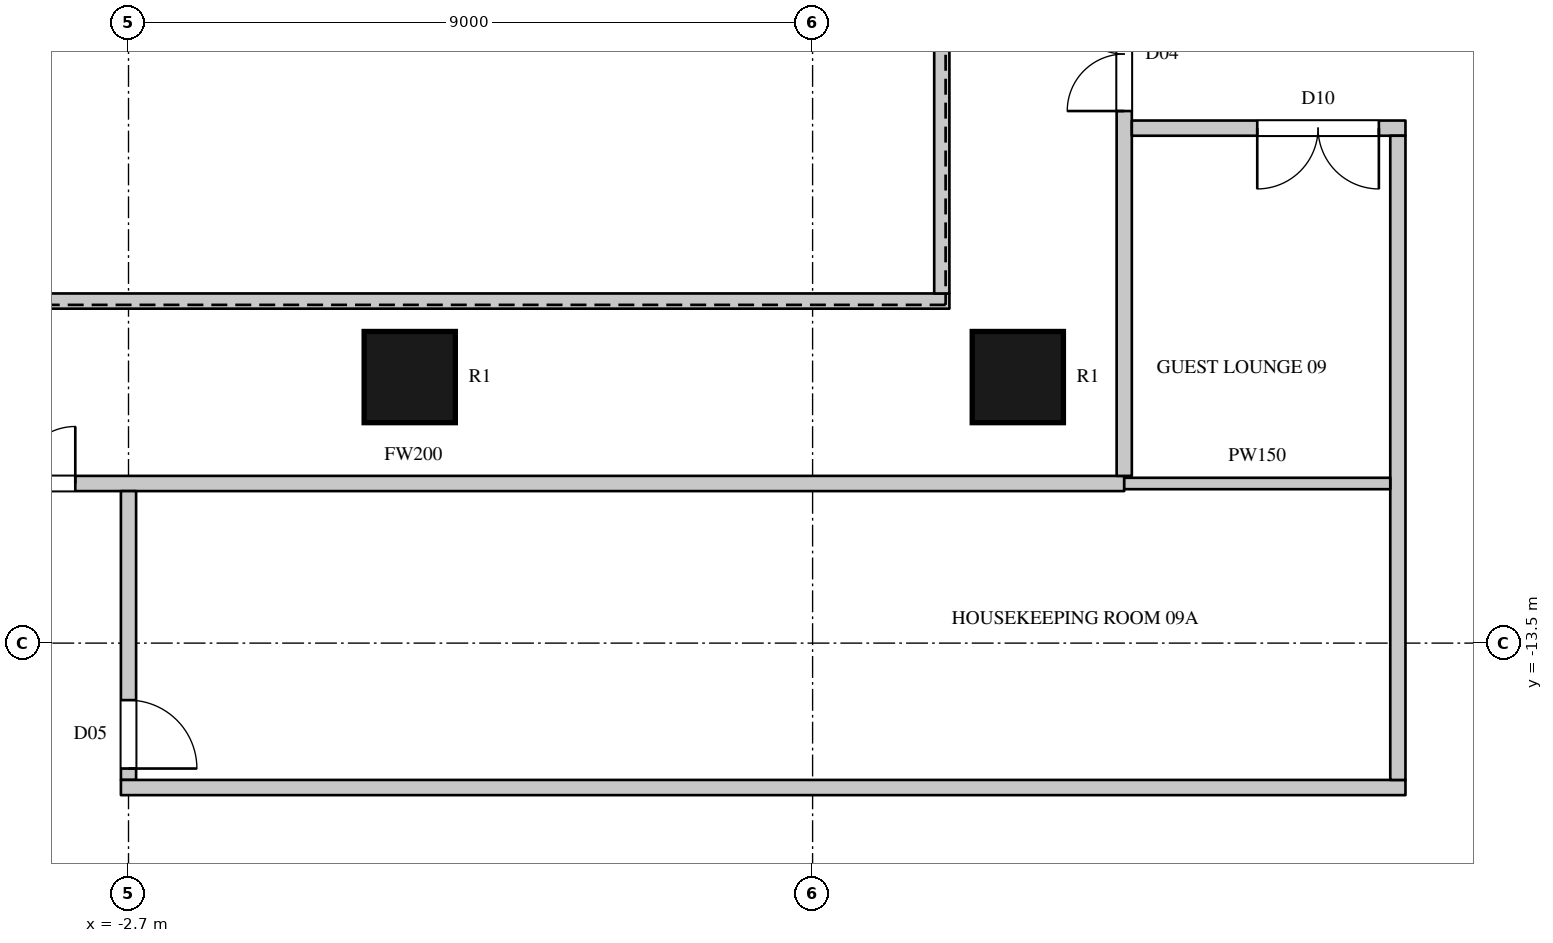
"""IFC4 building model, lengths in metres.
Left out: names, types, materials, properties, quantities, classifications, styles, units other than length and angle.
Written with IfcOpenShell. Run it as: python <this file> out.ifc"""

import sys

from ifc_helpers import new_model, si_unit, direction, frame, frame_2d, origin, origin_2d, place, context, subcontext, project, spatial, rectangle, circle, extrude, element, fill, save


model = new_model("IFC4")
c1 = context("Model", 3, precision=1e-05, world=origin(), true_north=direction((0.0, 1.0)))
c2 = subcontext(c1, "Body", "Model", "MODEL_VIEW")
j1 = project(units=[si_unit("LENGTHUNIT", "METRE"), si_unit("PLANEANGLEUNIT", "RADIAN")], contexts=[c1])
p1 = place(None, origin())
s1 = spatial("IfcSite", under=j1, at=p1, CompositionType="ELEMENT")
p2 = place(p1, origin())
s2 = spatial("IfcBuilding", under=s1, at=p2, CompositionType="ELEMENT")
p3 = place(p2, frame((0.0, 0.0, 62.7)))
s3 = spatial("IfcBuildingStorey", under=s2, at=p3, CompositionType="ELEMENT", Elevation=62.7)
for number, where, z_axis, x_axis in (
    (1, (1.0, -10.0, 0.0), (0.0, 0.0, 1.0), (1.0, 0.0, 0.0)),
    (2, (9.0, -10.0, 0.0), (0.0, 0.0, 1.0), (1.0, 0.0, 0.0)),
):
    element("IfcColumn", number, at=place(p3, frame(where, z_axis=z_axis, x_axis=x_axis)), inside=s3, PredefinedType="COLUMN", context=c2, shape_type="SweptSolid", body=[
        extrude(circle(Radius=0.6, at=origin_2d()), origin(), (0.0, 0.0, 1.0), 3.6),
    ])
p4 = place(p3, frame((-8.3, -11.4, 0.0), z_axis=(0.0, 0.0, 1.0), x_axis=(1.0, 0.0, 0.0)))
e3 = element("IfcWall", 3, at=p4, inside=s3, PredefinedType="PARTITIONING", context=c2, shape_type="SweptSolid", body=[
    extrude(rectangle(XDim=18.7, YDim=0.2, at=frame_2d((9.35, 0.0))), origin(), (0.0, 0.0, 1.0), 3.3),
])
p5 = place(p4, frame((3.4, 0.0, 0.0)))
e4 = element("IfcOpeningElement", 4, at=p5, cuts=e3, PredefinedType="OPENING", context=c2, shape_type="SweptSolid", body=[
    extrude(rectangle(XDim=1.5, YDim=2.2, at=frame_2d((0.75, 1.1))), frame((0.0, 0.11, 0.0), z_axis=(0.0, -1.0, 0.0), x_axis=(1.0, 0.0, 0.0)), (0.0, 0.0, 1.0), 0.22),
])
p6 = place(p3, frame((-6.1, -9.0, 0.0), z_axis=(0.0, 0.0, 1.0), x_axis=(1.0, 0.0, 0.0)))
e5 = element("IfcWall", 5, at=p6, inside=s3, PredefinedType="PARTITIONING", context=c2, shape_type="SweptSolid", body=[
    extrude(rectangle(XDim=14.2, YDim=0.2, at=frame_2d((7.1, 0.0))), origin(), (0.0, 0.0, 1.0), 3.3),
])
p7 = place(p3, frame((-2.7, -15.3, 0.0), z_axis=(0.0, 0.0, 1.0), x_axis=(0.0, 1.0, 0.0)))
e6 = element("IfcWall", 6, at=p7, inside=s3, PredefinedType="PARTITIONING", context=c2, shape_type="SweptSolid", body=[
    extrude(rectangle(XDim=3.8, YDim=0.2, at=frame_2d((1.9, 0.0))), origin(), (0.0, 0.0, 1.0), 2.75),
])
p8 = place(p7, frame((0.15, 0.0, 0.0)))
e7 = element("IfcOpeningElement", 7, at=p8, cuts=e6, PredefinedType="OPENING", context=c2, shape_type="SweptSolid", body=[
    extrude(rectangle(XDim=0.9, YDim=2.2, at=frame_2d((0.45, 1.1))), frame((0.0, 0.11, 0.0), z_axis=(0.0, -1.0, 0.0), x_axis=(1.0, 0.0, 0.0)), (0.0, 0.0, 1.0), 0.22),
])
p9 = place(p3, frame((-2.8, -15.4, 0.0), z_axis=(0.0, 0.0, 1.0), x_axis=(1.0, 0.0, 0.0)))
e8 = element("IfcWall", 8, at=p9, inside=s3, PredefinedType="PARTITIONING", context=c2, shape_type="SweptSolid", body=[
    extrude(rectangle(XDim=16.9, YDim=0.2, at=frame_2d((8.45, 0.0))), origin(), (0.0, 0.0, 1.0), 3.3),
])
p10 = place(p3, frame((8.0, -8.9, 0.0), z_axis=(0.0, 0.0, 1.0), x_axis=(0.0, 1.0, 0.0)))
e9 = element("IfcWall", 9, at=p10, inside=s3, PredefinedType="PARTITIONING", context=c2, shape_type="SweptSolid", body=[
    extrude(rectangle(XDim=17.8, YDim=0.2, at=frame_2d((8.9, 0.0))), origin(), (0.0, 0.0, 1.0), 3.3),
])
p11 = place(p3, frame((10.4, -11.3, 0.0), z_axis=(0.0, 0.0, 1.0), x_axis=(0.0, 1.0, 0.0)))
e10 = element("IfcWall", 10, at=p11, inside=s3, PredefinedType="PARTITIONING", context=c2, shape_type="SweptSolid", body=[
    extrude(rectangle(XDim=22.6, YDim=0.2, at=frame_2d((11.3, 0.0))), origin(), (0.0, 0.0, 1.0), 3.3),
])
p12 = place(p11, frame((4.8, 0.0, 0.0)))
e11 = element("IfcOpeningElement", 11, at=p12, cuts=e10, PredefinedType="OPENING", context=c2, shape_type="SweptSolid", body=[
    extrude(rectangle(XDim=1.5, YDim=2.2, at=frame_2d((0.75, 1.1))), frame((0.0, 0.11, 0.0), z_axis=(0.0, -1.0, 0.0), x_axis=(1.0, 0.0, 0.0)), (0.0, 0.0, 1.0), 0.22),
])
p13 = place(p11, frame((16.3, 0.0, 0.0)))
e12 = element("IfcOpeningElement", 12, at=p13, cuts=e10, PredefinedType="OPENING", context=c2, shape_type="SweptSolid", body=[
    extrude(rectangle(XDim=1.5, YDim=2.2, at=frame_2d((0.75, 1.1))), frame((0.0, 0.11, 0.0), z_axis=(0.0, -1.0, 0.0), x_axis=(1.0, 0.0, 0.0)), (0.0, 0.0, 1.0), 0.22),
])
p14 = place(p11, frame((11.95, 0.0, 0.0)))
e13 = element("IfcOpeningElement", 13, at=p14, cuts=e10, PredefinedType="OPENING", context=c2, shape_type="SweptSolid", body=[
    extrude(rectangle(XDim=1.5, YDim=2.2, at=frame_2d((0.75, 1.1))), frame((0.0, 0.11, 0.0), z_axis=(0.0, -1.0, 0.0), x_axis=(1.0, 0.0, 0.0)), (0.0, 0.0, 1.0), 0.22),
])
p15 = place(p3, frame((10.5, -6.725, 0.0), z_axis=(0.0, 0.0, 1.0), x_axis=(1.0, 0.0, 0.0)))
e14 = element("IfcWall", 14, at=p15, inside=s3, PredefinedType="PARTITIONING", context=c2, shape_type="SweptSolid", body=[
    extrude(rectangle(XDim=3.6, YDim=0.2, at=frame_2d((1.8, 0.0))), origin(), (0.0, 0.0, 1.0), 3.3),
])
p16 = place(p15, frame((1.65, 0.0, 0.0)))
e15 = element("IfcOpeningElement", 15, at=p16, cuts=e14, PredefinedType="OPENING", context=c2, shape_type="SweptSolid", body=[
    extrude(rectangle(XDim=1.6, YDim=2.4, at=frame_2d((0.8, 1.2))), frame((0.0, 0.11, 0.0), z_axis=(0.0, -1.0, 0.0), x_axis=(1.0, 0.0, 0.0)), (0.0, 0.0, 1.0), 0.22),
])
p17 = place(p3, frame((14.0, -15.3, 0.0), z_axis=(0.0, 0.0, 1.0), x_axis=(0.0, 1.0, 0.0)))
e16 = element("IfcWall", 16, at=p17, inside=s3, PredefinedType="PARTITIONING", context=c2, shape_type="SweptSolid", body=[
    extrude(rectangle(XDim=8.475, YDim=0.2, at=frame_2d((4.238, 0.0))), origin(), (0.0, 0.0, 1.0), 3.3),
])
p18 = place(p3, frame((10.4, -11.4, 0.0), z_axis=(0.0, 0.0, 1.0), x_axis=(1.0, 0.0, 0.0)))
e17 = element("IfcWall", 17, at=p18, inside=s3, PredefinedType="PARTITIONING", context=c2, shape_type="SweptSolid", body=[
    extrude(rectangle(XDim=3.5, YDim=0.15, at=frame_2d((1.75, 0.0))), origin(), (0.0, 0.0, 1.0), 3.3),
])
p19 = place(p5, origin())
e18 = element("IfcDoor", 18, at=p19, inside=s3, OperationType="DOUBLE_DOOR_SINGLE_SWING", PredefinedType="DOOR", context=c2, shape_type="SweptSolid", body=[
    extrude(rectangle(XDim=1.5, YDim=2.2, at=frame_2d((0.75, 1.1))), frame((0.0, 0.025, 0.0), z_axis=(0.0, -1.0, 0.0), x_axis=(1.0, 0.0, 0.0)), (0.0, 0.0, 1.0), 0.05),
])
fill(e4, e18)
p20 = place(p12, origin())
e19 = element("IfcDoor", 19, at=p20, inside=s3, OperationType="DOUBLE_DOOR_SINGLE_SWING", PredefinedType="DOOR", context=c2, shape_type="SweptSolid", body=[
    extrude(rectangle(XDim=1.5, YDim=2.2, at=frame_2d((0.75, 1.1))), frame((0.0, 0.025, 0.0), z_axis=(0.0, -1.0, 0.0), x_axis=(1.0, 0.0, 0.0)), (0.0, 0.0, 1.0), 0.05),
])
fill(e11, e19)
p21 = place(p8, origin())
e20 = element("IfcDoor", 20, at=p21, inside=s3, OperationType="SINGLE_SWING_RIGHT", PredefinedType="DOOR", context=c2, shape_type="SweptSolid", body=[
    extrude(rectangle(XDim=0.9, YDim=2.2, at=frame_2d((0.45, 1.1))), frame((0.0, 0.025, 0.0), z_axis=(0.0, -1.0, 0.0), x_axis=(1.0, 0.0, 0.0)), (0.0, 0.0, 1.0), 0.05),
])
fill(e7, e20)
p22 = place(p16, origin())
e21 = element("IfcDoor", 21, at=p22, inside=s3, OperationType="DOUBLE_DOOR_SINGLE_SWING", PredefinedType="DOOR", context=c2, shape_type="SweptSolid", body=[
    extrude(rectangle(XDim=1.6, YDim=2.4, at=frame_2d((0.8, 1.2))), frame((0.0, 0.025, 0.0), z_axis=(0.0, -1.0, 0.0), x_axis=(1.0, 0.0, 0.0)), (0.0, 0.0, 1.0), 0.05),
])
fill(e15, e21)
save(model, sys.argv[1])
